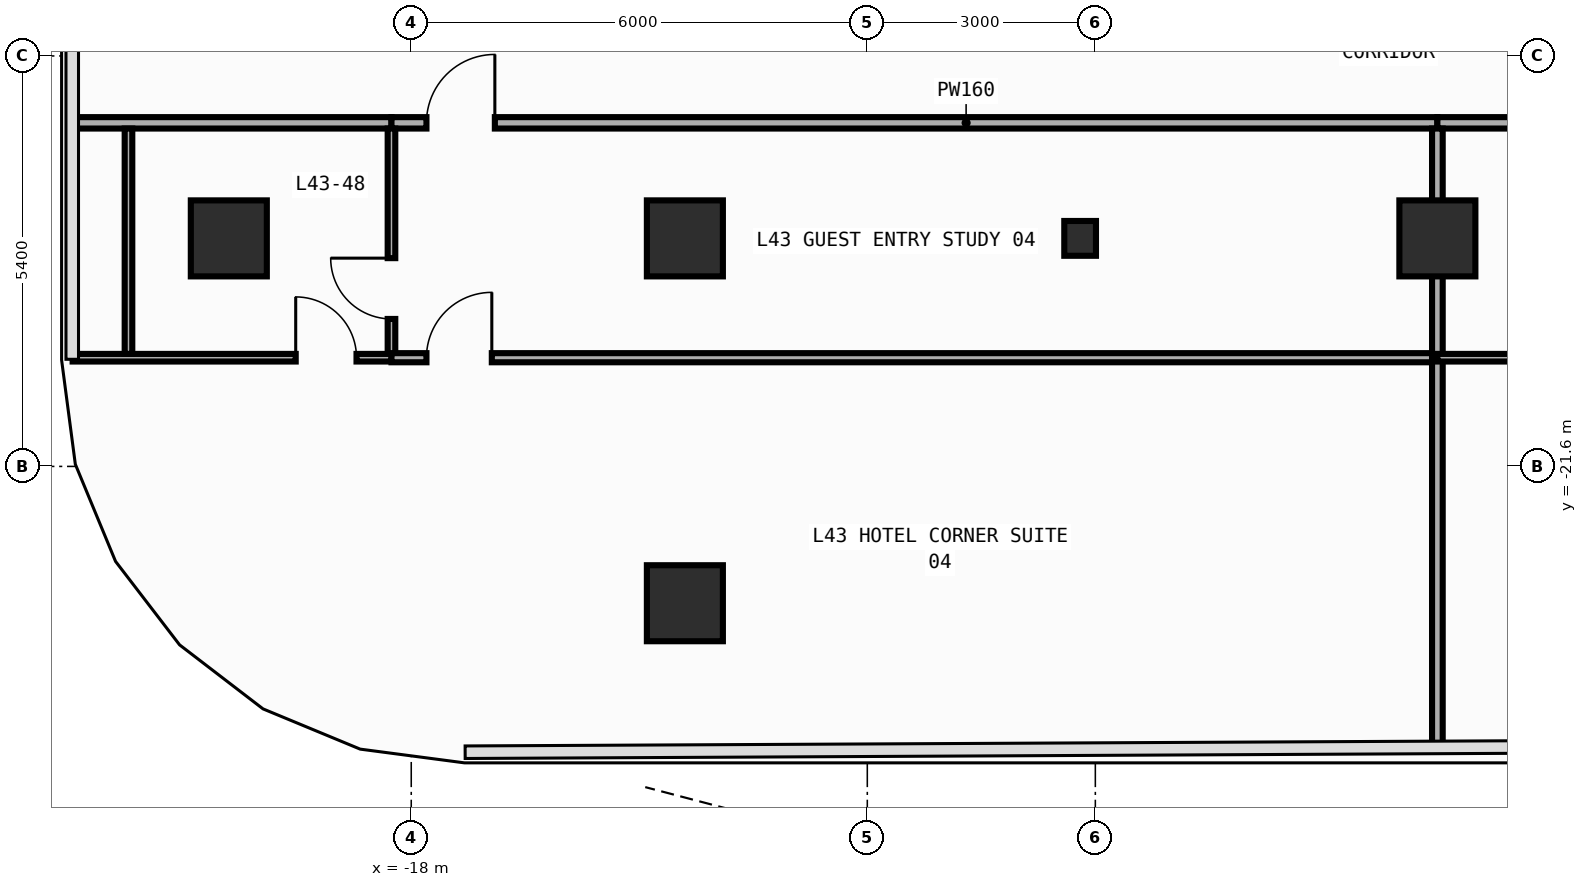
"""IFC4 building model, lengths in metres.
Left out: names, types, materials, properties, quantities, classifications, styles, units other than length and angle.
Written with IfcOpenShell. Run it as: python <this file> out.ifc"""

import sys

from ifc_helpers import new_model, si_unit, direction, frame, frame_2d, origin, origin_2d, place, context, subcontext, project, spatial, rectangle, i_section, extrude, element, fill, save


model = new_model("IFC4")
c1 = context("Model", 3, precision=1e-05, world=origin(), true_north=direction((0.0, 1.0)))
c2 = subcontext(c1, "Body", "Model", "MODEL_VIEW")
j1 = project(units=[si_unit("LENGTHUNIT", "METRE"), si_unit("PLANEANGLEUNIT", "RADIAN")], contexts=[c1])
p1 = place(None, origin())
s1 = spatial("IfcSite", under=j1, at=p1, CompositionType="ELEMENT")
p2 = place(p1, origin())
s2 = spatial("IfcBuilding", under=s1, at=p2, CompositionType="ELEMENT")
p3 = place(p2, frame((0.0, 0.0, 187.8)))
s3 = spatial("IfcBuildingStorey", under=s2, at=p3, CompositionType="ELEMENT", Elevation=187.8)
p4 = place(p3, frame((-9.2, -18.6, 0.0), z_axis=(0.0, 0.0, 1.0), x_axis=(1.0, 0.0, 0.0)))
e1 = element("IfcColumn", 1, at=p4, inside=s3, PredefinedType="COLUMN", context=c2, shape_type="SweptSolid", body=[
    extrude(i_section(OverallWidth=0.417, OverallDepth=0.458, WebThickness=0.03, FlangeThickness=0.05, FilletRadius=0.022, at=origin_2d()), origin(), (0.0, 0.0, 1.0), 3.8),
])
for number, where, z_axis, x_axis in (
    (2, (-20.4, -18.6, 0.0), (0.0, 0.0, 1.0), (1.0, 0.0, 0.0)),
    (3, (-14.4, -18.6, 0.0), (0.0, 0.0, 1.0), (1.0, 0.0, 0.0)),
    (4, (-4.5, -18.6, 0.0), (0.0, 0.0, 1.0), (1.0, 0.0, 0.0)),
    (5, (-14.4, -23.4, 0.0), (0.0, 0.0, 1.0), (1.0, 0.0, 0.0)),
):
    element("IfcColumn", number, at=place(p3, frame(where, z_axis=z_axis, x_axis=x_axis)), inside=s3, PredefinedType="COLUMN", context=c2, shape_type="SweptSolid", body=[
        extrude(rectangle(XDim=1.0, YDim=1.0, at=origin_2d()), origin(), (0.0, 0.0, 1.0), 3.8),
    ])
p5 = place(p3, frame((-22.455, -17.08, 0.0), z_axis=(0.0, 0.0, 1.0), x_axis=(1.0, 0.0, 0.0)))
e6 = element("IfcWall", 6, at=p5, inside=s3, PredefinedType="PARTITIONING", context=c2, shape_type="SweptSolid", body=[
    extrude(rectangle(XDim=4.195, YDim=0.15, at=frame_2d((2.098, 0.0))), origin(), (0.0, 0.0, 1.0), 3.54),
])
p6 = place(p3, frame((-18.26, -17.08, 0.0), z_axis=(0.0, 0.0, 1.0), x_axis=(1.0, 0.0, 0.0)))
e7 = element("IfcWall", 7, at=p6, inside=s3, PredefinedType="PARTITIONING", context=c2, shape_type="SweptSolid", body=[
    extrude(rectangle(XDim=13.76, YDim=0.15, at=frame_2d((6.88, 0.0))), origin(), (0.0, 0.0, 1.0), 3.54),
])
p7 = place(p6, frame((0.46, 0.0, 0.0)))
e8 = element("IfcOpeningElement", 8, at=p7, cuts=e7, PredefinedType="OPENING", context=c2, shape_type="SweptSolid", body=[
    extrude(rectangle(XDim=0.9, YDim=2.15, at=frame_2d((0.45, 1.075))), frame((0.0, 0.085, 0.0), z_axis=(0.0, -1.0, 0.0), x_axis=(1.0, 0.0, 0.0)), (0.0, 0.0, 1.0), 0.17),
])
p8 = place(p3, frame((-4.5, -17.08, 0.0), z_axis=(0.0, 0.0, 1.0), x_axis=(1.0, 0.0, 0.0)))
e9 = element("IfcWall", 9, at=p8, inside=s3, PredefinedType="PARTITIONING", context=c2, shape_type="SweptSolid", body=[
    extrude(rectangle(XDim=3.54, YDim=0.15, at=frame_2d((1.77, 0.0))), origin(), (0.0, 0.0, 1.0), 3.54),
])
p9 = place(p3, frame((-18.26, -20.12, 0.0), z_axis=(0.0, 0.0, 1.0), x_axis=(0.0, 1.0, 0.0)))
e10 = element("IfcWall", 10, at=p9, inside=s3, PredefinedType="PARTITIONING", context=c2, shape_type="SweptSolid", body=[
    extrude(rectangle(XDim=2.965, YDim=0.1, at=frame_2d((1.482, 0.0))), origin(), (0.0, 0.0, 1.0), 3.54),
])
p10 = place(p9, frame((0.46, 0.0, 0.0)))
e11 = element("IfcOpeningElement", 11, at=p10, cuts=e10, PredefinedType="OPENING", context=c2, shape_type="SweptSolid", body=[
    extrude(rectangle(XDim=0.8, YDim=2.1, at=frame_2d((0.4, 1.05))), frame((0.0, 0.06, 0.0), z_axis=(0.0, -1.0, 0.0), x_axis=(1.0, 0.0, 0.0)), (0.0, 0.0, 1.0), 0.12),
])
p11 = place(p3, frame((-22.455, -20.17, 0.0), z_axis=(0.0, 0.0, 1.0), x_axis=(1.0, 0.0, 0.0)))
e12 = element("IfcWall", 12, at=p11, inside=s3, PredefinedType="PARTITIONING", context=c2, shape_type="SweptSolid", body=[
    extrude(rectangle(XDim=4.195, YDim=0.1, at=frame_2d((2.098, 0.0))), origin(), (0.0, 0.0, 1.0), 3.54),
])
p12 = place(p11, frame((2.935, 0.0, 0.0)))
e13 = element("IfcOpeningElement", 13, at=p12, cuts=e12, PredefinedType="OPENING", context=c2, shape_type="SweptSolid", body=[
    extrude(rectangle(XDim=0.8, YDim=2.1, at=frame_2d((0.4, 1.05))), frame((0.0, 0.06, 0.0), z_axis=(0.0, -1.0, 0.0), x_axis=(1.0, 0.0, 0.0)), (0.0, 0.0, 1.0), 0.12),
])
p13 = place(p3, frame((-18.26, -20.17, 0.0), z_axis=(0.0, 0.0, 1.0), x_axis=(1.0, 0.0, 0.0)))
e14 = element("IfcWall", 14, at=p13, inside=s3, PredefinedType="PARTITIONING", context=c2, shape_type="SweptSolid", body=[
    extrude(rectangle(XDim=13.76, YDim=0.12, at=frame_2d((6.88, 0.0))), origin(), (0.0, 0.0, 1.0), 3.54),
])
p14 = place(p13, frame((0.46, 0.0, 0.0)))
e15 = element("IfcOpeningElement", 15, at=p14, cuts=e14, PredefinedType="OPENING", context=c2, shape_type="SweptSolid", body=[
    extrude(rectangle(XDim=0.86, YDim=2.15, at=frame_2d((0.43, 1.075))), frame((0.0, 0.07, 0.0), z_axis=(0.0, -1.0, 0.0), x_axis=(1.0, 0.0, 0.0)), (0.0, 0.0, 1.0), 0.14),
])
p15 = place(p3, frame((-4.5, -20.17, 0.0), z_axis=(0.0, 0.0, 1.0), x_axis=(0.0, 1.0, 0.0)))
e16 = element("IfcWall", 16, at=p15, inside=s3, PredefinedType="PARTITIONING", context=c2, shape_type="SweptSolid", body=[
    extrude(rectangle(XDim=3.015, YDim=0.14, at=frame_2d((1.507, 0.0))), origin(), (0.0, 0.0, 1.0), 3.54),
])
p16 = place(p3, frame((-4.5, -25.292, 0.0), z_axis=(0.0, 0.0, 1.0), x_axis=(0.0, 1.0, 0.0)))
e17 = element("IfcWall", 17, at=p16, inside=s3, PredefinedType="PARTITIONING", context=c2, shape_type="SweptSolid", body=[
    extrude(rectangle(XDim=5.122, YDim=0.14, at=frame_2d((2.561, 0.0))), origin(), (0.0, 0.0, 1.0), 3.54),
])
p17 = place(p3, frame((-4.5, -20.17, 0.0), z_axis=(0.0, 0.0, 1.0), x_axis=(1.0, 0.0, 0.0)))
e18 = element("IfcWall", 18, at=p17, inside=s3, PredefinedType="PARTITIONING", context=c2, shape_type="SweptSolid", body=[
    extrude(rectangle(XDim=3.54, YDim=0.1, at=frame_2d((1.77, 0.0))), origin(), (0.0, 0.0, 1.0), 3.54),
])
p18 = place(p17, frame((1.875, 0.0, 0.0)))
e19 = element("IfcOpeningElement", 19, at=p18, cuts=e18, PredefinedType="OPENING", context=c2, shape_type="SweptSolid", body=[
    extrude(rectangle(XDim=0.8, YDim=2.1, at=frame_2d((0.4, 1.05))), frame((0.0, 0.06, 0.0), z_axis=(0.0, -1.0, 0.0), x_axis=(1.0, 0.0, 0.0)), (0.0, 0.0, 1.0), 0.12),
])
p19 = place(p3, frame((-21.72, -20.12, 0.0), z_axis=(0.0, 0.0, 1.0), x_axis=(0.0, 1.0, 0.0)))
e20 = element("IfcWall", 20, at=p19, inside=s3, PredefinedType="PARTITIONING", context=c2, shape_type="SweptSolid", body=[
    extrude(rectangle(XDim=2.965, YDim=0.1, at=frame_2d((1.482, 0.0))), origin(), (0.0, 0.0, 1.0), 3.54),
])
p20 = place(p7, origin())
e21 = element("IfcDoor", 21, at=p20, inside=s3, OperationType="SINGLE_SWING_RIGHT", PredefinedType="DOOR", context=c2, shape_type="SweptSolid", body=[
    extrude(rectangle(XDim=0.9, YDim=2.15, at=frame_2d((0.45, 1.075))), frame((0.0, 0.025, 0.0), z_axis=(0.0, -1.0, 0.0), x_axis=(1.0, 0.0, 0.0)), (0.0, 0.0, 1.0), 0.05),
])
fill(e8, e21)
p21 = place(p10, origin())
e22 = element("IfcDoor", 22, at=p21, inside=s3, OperationType="SINGLE_SWING_RIGHT", PredefinedType="DOOR", context=c2, shape_type="SweptSolid", body=[
    extrude(rectangle(XDim=0.8, YDim=2.1, at=frame_2d((0.4, 1.05))), frame((0.0, 0.025, 0.0), z_axis=(0.0, -1.0, 0.0), x_axis=(1.0, 0.0, 0.0)), (0.0, 0.0, 1.0), 0.05),
])
fill(e11, e22)
p22 = place(p12, origin())
e23 = element("IfcDoor", 23, at=p22, inside=s3, OperationType="SINGLE_SWING_LEFT", PredefinedType="DOOR", context=c2, shape_type="SweptSolid", body=[
    extrude(rectangle(XDim=0.8, YDim=2.1, at=frame_2d((0.4, 1.05))), frame((0.0, 0.025, 0.0), z_axis=(0.0, -1.0, 0.0), x_axis=(1.0, 0.0, 0.0)), (0.0, 0.0, 1.0), 0.05),
])
fill(e13, e23)
p23 = place(p14, origin())
e24 = element("IfcDoor", 24, at=p23, inside=s3, OperationType="SINGLE_SWING_RIGHT", PredefinedType="DOOR", context=c2, shape_type="SweptSolid", body=[
    extrude(rectangle(XDim=0.86, YDim=2.15, at=frame_2d((0.43, 1.075))), frame((0.0, 0.025, 0.0), z_axis=(0.0, -1.0, 0.0), x_axis=(1.0, 0.0, 0.0)), (0.0, 0.0, 1.0), 0.05),
])
fill(e15, e24)
save(model, sys.argv[1])
